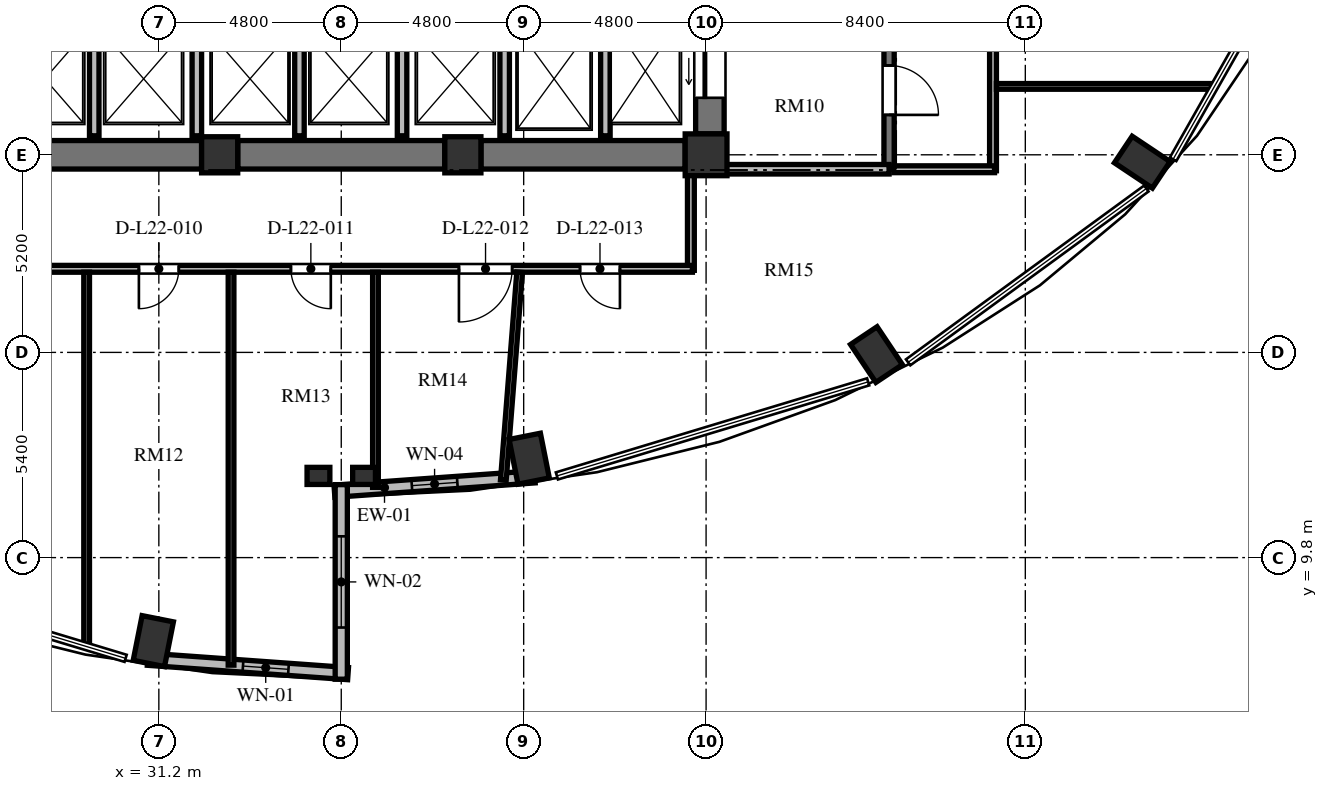
"""IFC4 building model, lengths in metres.
Left out: names, types, materials, properties, quantities, classifications, styles, units other than length and angle.
Written with IfcOpenShell. Run it as: python <this file> out.ifc"""

import sys

from ifc_helpers import new_model, si_unit, direction, frame, frame_2d, origin, origin_2d, place, context, subcontext, project, spatial, rectangle, extrude, element, fill, save


model = new_model("IFC4")
c1 = context("Model", 3, precision=1e-05, world=origin(), true_north=direction((0.0, 1.0)))
c2 = subcontext(c1, "Body", "Model", "MODEL_VIEW")
j1 = project(units=[si_unit("LENGTHUNIT", "METRE"), si_unit("PLANEANGLEUNIT", "RADIAN")], contexts=[c1])
p1 = place(None, origin())
s1 = spatial("IfcSite", under=j1, at=p1, CompositionType="ELEMENT")
p2 = place(p1, origin())
s2 = spatial("IfcBuilding", under=s1, at=p2, CompositionType="ELEMENT")
p3 = place(p2, frame((0.0, 0.0, 89.04)))
s3 = spatial("IfcBuildingStorey", under=s2, at=p3, CompositionType="ELEMENT", Elevation=89.04)
for number, where, z_axis, x_axis in (
    (1, (40.946, 12.403, 0.0), (0.0, 0.0, 1.0), (0.195, -0.981, 0.0)),
    (2, (50.084, 15.143, 0.0), (0.0, 0.0, 1.0), (0.556, -0.831, 0.0)),
    (3, (57.078, 20.205, 0.0), (0.0, 0.0, 1.0), (0.831, -0.556, 0.0)),
    (4, (31.054, 7.603, 0.0), (0.0, 0.0, 1.0), (-0.195, -0.981, 0.0)),
):
    element("IfcColumn", number, at=place(p3, frame(where, z_axis=z_axis, x_axis=x_axis)), inside=s3, PredefinedType="COLUMN", context=c2, shape_type="SweptSolid", body=[
        extrude(rectangle(XDim=1.2, YDim=0.84, at=origin_2d()), origin(), (0.0, 0.0, 1.0), 3.648),
    ])
for number, where, z_axis, x_axis in (
    (5, (32.8, 20.4, 0.0), (0.0, 0.0, 1.0), (1.0, 0.0, 0.0)),
    (6, (39.2, 20.4, 0.0), (0.0, 0.0, 1.0), (1.0, 0.0, 0.0)),
):
    element("IfcColumn", number, at=place(p3, frame(where, z_axis=z_axis, x_axis=x_axis)), inside=s3, PredefinedType="COLUMN", context=c2, shape_type="SweptSolid", body=[
        extrude(rectangle(XDim=0.95, YDim=0.95, at=origin_2d()), origin(), (0.0, 0.0, 1.0), 3.648),
    ])
p4 = place(p3, frame((45.6, 20.4, 0.0), z_axis=(0.0, 0.0, 1.0), x_axis=(1.0, 0.0, 0.0)))
e7 = element("IfcColumn", 7, at=p4, inside=s3, PredefinedType="COLUMN", context=c2, shape_type="SweptSolid", body=[
    extrude(rectangle(XDim=1.1, YDim=1.1, at=origin_2d()), origin(), (0.0, 0.0, 1.0), 3.648),
])
for number, where, z_axis, x_axis in (
    (8, (35.4, 11.95, 0.0), (0.0, 0.0, 1.0), (1.0, 0.0, 0.0)),
    (9, (36.6, 11.95, 0.0), (0.0, 0.0, 1.0), (1.0, 0.0, 0.0)),
):
    element("IfcColumn", number, at=place(p3, frame(where, z_axis=z_axis, x_axis=x_axis)), inside=s3, PredefinedType="PILASTER", context=c2, shape_type="SweptSolid", body=[
        extrude(rectangle(XDim=0.6, YDim=0.45, at=origin_2d()), origin(), (0.0, 0.0, 1.0), 3.648),
    ])
p5 = place(p3, frame((45.7, 20.95, 0.0), z_axis=(0.0, 0.0, 1.0), x_axis=(0.0, 1.0, 0.0)))
e10 = element("IfcWall", 10, at=p5, inside=s3, PredefinedType="SHEAR", context=c2, shape_type="SweptSolid", body=[
    extrude(rectangle(XDim=14.1, YDim=0.75, at=frame_2d((7.05, 0.0))), origin(), (0.0, 0.0, 1.0), 3.648),
])
p6 = place(p5, frame((11.75, 0.0, 0.0)))
e11 = element("IfcOpeningElement", 11, at=p6, cuts=e10, PredefinedType="OPENING", context=c2, shape_type="SweptSolid", body=[
    extrude(rectangle(XDim=1.4, YDim=2.3, at=frame_2d((0.7, 1.15))), frame((0.0, 0.385, 0.0), z_axis=(0.0, -1.0, 0.0), x_axis=(1.0, 0.0, 0.0)), (0.0, 0.0, 1.0), 0.77),
])
p7 = place(p5, frame((0.95, 0.0, 0.0)))
e12 = element("IfcOpeningElement", 12, at=p7, cuts=e10, PredefinedType="OPENING", context=c2, shape_type="SweptSolid", body=[
    extrude(rectangle(XDim=1.4, YDim=2.3, at=frame_2d((0.7, 1.15))), frame((0.0, 0.385, 0.0), z_axis=(0.0, -1.0, 0.0), x_axis=(1.0, 0.0, 0.0)), (0.0, 0.0, 1.0), 0.77),
])
p8 = place(p3, frame((26.95, 20.4, 0.0), z_axis=(0.0, 0.0, 1.0), x_axis=(1.0, 0.0, 0.0)))
e13 = element("IfcWall", 13, at=p8, inside=s3, PredefinedType="SHEAR", context=c2, shape_type="SweptSolid", body=[
    extrude(rectangle(XDim=5.375, YDim=0.75, at=frame_2d((2.688, 0.0))), origin(), (0.0, 0.0, 1.0), 3.648),
])
p9 = place(p3, frame((33.275, 20.4, 0.0), z_axis=(0.0, 0.0, 1.0), x_axis=(1.0, 0.0, 0.0)))
e14 = element("IfcWall", 14, at=p9, inside=s3, PredefinedType="SHEAR", context=c2, shape_type="SweptSolid", body=[
    extrude(rectangle(XDim=5.45, YDim=0.75, at=frame_2d((2.725, 0.0))), origin(), (0.0, 0.0, 1.0), 3.648),
])
p10 = place(p3, frame((39.675, 20.4, 0.0), z_axis=(0.0, 0.0, 1.0), x_axis=(1.0, 0.0, 0.0)))
e15 = element("IfcWall", 15, at=p10, inside=s3, PredefinedType="SHEAR", context=c2, shape_type="SweptSolid", body=[
    extrude(rectangle(XDim=5.375, YDim=0.75, at=frame_2d((2.688, 0.0))), origin(), (0.0, 0.0, 1.0), 3.648),
])
p11 = place(p3, frame((35.821, 11.547, 0.0), z_axis=(0.0, 0.0, 1.0), x_axis=(0.997432364291, 0.071614793619, 0.0)))
e16 = element("IfcWall", 16, at=p11, inside=s3, PredefinedType="SOLIDWALL", context=c2, shape_type="SweptSolid", body=[
    extrude(rectangle(XDim=5.284, YDim=0.32, at=frame_2d((2.642, 0.0))), origin(), (0.0, 0.0, 1.0), 3.428),
])
p12 = place(p11, frame((2.042, 0.0, 0.85)))
e17 = element("IfcOpeningElement", 17, at=p12, cuts=e16, PredefinedType="OPENING", context=c2, shape_type="SweptSolid", body=[
    extrude(rectangle(XDim=1.2, YDim=1.8, at=frame_2d((0.6, 0.9))), frame((0.0, 0.17, 0.0), z_axis=(0.0, -1.0, 0.0), x_axis=(1.0, 0.0, 0.0)), (0.0, 0.0, 1.0), 0.34),
])
p13 = place(p3, frame((30.909, 7.125, 0.0), z_axis=(0.0, 0.0, 1.0), x_axis=(0.997431890304, -0.071621394884, 0.0)))
e18 = element("IfcWall", 18, at=p13, inside=s3, PredefinedType="SOLIDWALL", context=c2, shape_type="SweptSolid", body=[
    extrude(rectangle(XDim=5.284, YDim=0.32, at=frame_2d((2.642, 0.0))), origin(), (0.0, 0.0, 1.0), 3.428),
])
p14 = place(p13, frame((2.511, 0.0, 0.85)))
e19 = element("IfcOpeningElement", 19, at=p14, cuts=e18, PredefinedType="OPENING", context=c2, shape_type="SweptSolid", body=[
    extrude(rectangle(XDim=1.2, YDim=2.2, at=frame_2d((0.6, 1.1))), frame((0.0, 0.17, 0.0), z_axis=(0.0, -1.0, 0.0), x_axis=(1.0, 0.0, 0.0)), (0.0, 0.0, 1.0), 0.34),
])
p15 = place(p3, frame((36.0, 6.6, 0.0), z_axis=(0.0, 0.0, 1.0), x_axis=(0.0, 1.0, 0.0)))
e20 = element("IfcWall", 20, at=p15, inside=s3, PredefinedType="SOLIDWALL", context=c2, shape_type="SweptSolid", body=[
    extrude(rectangle(XDim=5.12, YDim=0.32, at=frame_2d((2.56, 0.0))), origin(), (0.0, 0.0, 1.0), 3.428),
])
p16 = place(p15, frame((1.36, 0.0, 0.84)))
e21 = element("IfcOpeningElement", 21, at=p16, cuts=e20, PredefinedType="OPENING", context=c2, shape_type="SweptSolid", body=[
    extrude(rectangle(XDim=2.4, YDim=2.04, at=frame_2d((1.2, 1.02))), frame((0.0, 0.17, 0.0), z_axis=(0.0, -1.0, 0.0), x_axis=(1.0, 0.0, 0.0)), (0.0, 0.0, 1.0), 0.34),
])
p17 = place(p3, frame((42.95, 20.9, 0.0), z_axis=(0.0, 0.0, 1.0), x_axis=(0.0, 1.0, 0.0)))
e22 = element("IfcWall", 22, at=p17, inside=s3, PredefinedType="SOLIDWALL", context=c2, shape_type="SweptSolid", body=[
    extrude(rectangle(XDim=3.2, YDim=0.25, at=frame_2d((1.6, 0.0))), origin(), (0.0, 0.0, 1.0), 3.428),
])
for number, where, z_axis, x_axis in (
    (23, (29.5, 20.9, 0.0), (0.0, 0.0, 1.0), (0.0, 1.0, 0.0)),
    (24, (32.2, 20.9, 0.0), (0.0, 0.0, 1.0), (0.0, 1.0, 0.0)),
    (25, (34.9, 20.9, 0.0), (0.0, 0.0, 1.0), (0.0, 1.0, 0.0)),
    (26, (37.6, 20.9, 0.0), (0.0, 0.0, 1.0), (0.0, 1.0, 0.0)),
    (27, (40.3, 20.9, 0.0), (0.0, 0.0, 1.0), (0.0, 1.0, 0.0)),
):
    element("IfcWall", number, at=place(p3, frame(where, z_axis=z_axis, x_axis=x_axis)), inside=s3, PredefinedType="SOLIDWALL", context=c2, shape_type="SweptSolid", body=[
        extrude(rectangle(XDim=2.8, YDim=0.25, at=frame_2d((1.4, 0.0))), origin(), (0.0, 0.0, 1.0), 3.428),
    ])
p18 = place(p3, frame((50.415, 35.845, 0.0), z_axis=(0.0, 0.0, 1.0), x_axis=(0.0, -1.0, 0.0)))
e28 = element("IfcWall", 28, at=p18, inside=s3, PredefinedType="SHEAR", context=c2, shape_type="SweptSolid", body=[
    extrude(rectangle(XDim=15.825, YDim=0.27, at=frame_2d((7.913, 0.0))), origin(), (0.0, 0.0, 1.0), 3.648),
])
p19 = place(p18, frame((4.445, 0.0, 0.0)))
e29 = element("IfcOpeningElement", 29, at=p19, cuts=e28, PredefinedType="OPENING", context=c2, shape_type="SweptSolid", body=[
    extrude(rectangle(XDim=1.2, YDim=2.15, at=frame_2d((0.6, 1.075))), frame((0.0, 0.145, 0.0), z_axis=(0.0, -1.0, 0.0), x_axis=(1.0, 0.0, 0.0)), (0.0, 0.0, 1.0), 0.29),
])
p20 = place(p18, frame((1.295, 0.0, 0.0)))
e30 = element("IfcOpeningElement", 30, at=p20, cuts=e28, PredefinedType="OPENING", context=c2, shape_type="SweptSolid", body=[
    extrude(rectangle(XDim=1.3, YDim=2.2, at=frame_2d((0.65, 1.1))), frame((0.0, 0.145, 0.0), z_axis=(0.0, -1.0, 0.0), x_axis=(1.0, 0.0, 0.0)), (0.0, 0.0, 1.0), 0.29),
])
p21 = place(p18, frame((13.095, 0.0, 0.0)))
e31 = element("IfcOpeningElement", 31, at=p21, cuts=e28, PredefinedType="OPENING", context=c2, shape_type="SweptSolid", body=[
    extrude(rectangle(XDim=1.3, YDim=2.2, at=frame_2d((0.65, 1.1))), frame((0.0, 0.145, 0.0), z_axis=(0.0, -1.0, 0.0), x_axis=(1.0, 0.0, 0.0)), (0.0, 0.0, 1.0), 0.29),
])
p22 = place(p3, frame((45.7, 20.02, 0.0), z_axis=(0.0, 0.0, 1.0), x_axis=(1.0, 0.0, 0.0)))
e32 = element("IfcWall", 32, at=p22, inside=s3, PredefinedType="SOLIDWALL", context=c2, shape_type="SweptSolid", body=[
    extrude(rectangle(XDim=4.715, YDim=0.25, at=frame_2d((2.357, 0.0))), origin(), (0.0, 0.0, 1.0), 3.428),
])
p23 = place(p3, frame((53.15, 26.64, 0.0), z_axis=(0.0, 0.0, 1.0), x_axis=(0.0, -1.0, 0.0)))
e33 = element("IfcWall", 33, at=p23, inside=s3, PredefinedType="PARTITIONING", context=c2, shape_type="SweptSolid", body=[
    extrude(rectangle(XDim=6.66, YDim=0.18, at=frame_2d((3.33, 0.0))), origin(), (0.0, 0.0, 1.0), 3.428),
])
p24 = place(p3, frame((53.19, 20.02, 0.0), z_axis=(0.0, 0.0, 1.0), x_axis=(-1.0, 0.0, 0.0)))
e34 = element("IfcWall", 34, at=p24, inside=s3, PredefinedType="PARTITIONING", context=c2, shape_type="SweptSolid", body=[
    extrude(rectangle(XDim=2.65, YDim=0.18, at=frame_2d((1.325, 0.0))), origin(), (0.0, 0.0, 1.0), 3.428),
])
p25 = place(p3, frame((45.2, 19.91, 0.0), z_axis=(0.0, 0.0, 1.0), x_axis=(0.0, -1.0, 0.0)))
e35 = element("IfcWall", 35, at=p25, inside=s3, PredefinedType="PARTITIONING", context=c2, shape_type="SweptSolid", body=[
    extrude(rectangle(XDim=2.55, YDim=0.18, at=frame_2d((1.275, 0.0))), origin(), (0.0, 0.0, 1.0), 3.428),
])
p26 = place(p3, frame((45.24, 17.4, 0.0), z_axis=(0.0, 0.0, 1.0), x_axis=(-1.0, 0.0, 0.0)))
e36 = element("IfcWall", 36, at=p26, inside=s3, PredefinedType="PARTITIONING", context=c2, shape_type="SweptSolid", body=[
    extrude(rectangle(XDim=21.93, YDim=0.18, at=frame_2d((10.965, 0.0))), origin(), (0.0, 0.0, 1.0), 3.053),
])
p27 = place(p26, frame((18.251, 0.0, 0.0)))
e37 = element("IfcOpeningElement", 37, at=p27, cuts=e36, PredefinedType="OPENING", context=c2, shape_type="SweptSolid", body=[
    extrude(rectangle(XDim=1.05, YDim=2.15, at=frame_2d((0.525, 1.075))), frame((0.0, 0.1, 0.0), z_axis=(0.0, -1.0, 0.0), x_axis=(1.0, 0.0, 0.0)), (0.0, 0.0, 1.0), 0.2),
])
p28 = place(p26, frame((13.515, 0.0, 0.0)))
e38 = element("IfcOpeningElement", 38, at=p28, cuts=e36, PredefinedType="OPENING", context=c2, shape_type="SweptSolid", body=[
    extrude(rectangle(XDim=1.05, YDim=2.15, at=frame_2d((0.525, 1.075))), frame((0.0, 0.1, 0.0), z_axis=(0.0, -1.0, 0.0), x_axis=(1.0, 0.0, 0.0)), (0.0, 0.0, 1.0), 0.2),
])
p29 = place(p26, frame((9.515, 0.0, 0.0)))
e39 = element("IfcOpeningElement", 39, at=p29, cuts=e36, PredefinedType="OPENING", context=c2, shape_type="SweptSolid", body=[
    extrude(rectangle(XDim=1.05, YDim=2.15, at=frame_2d((0.525, 1.075))), frame((0.0, 0.1, 0.0), z_axis=(0.0, -1.0, 0.0), x_axis=(1.0, 0.0, 0.0)), (0.0, 0.0, 1.0), 0.2),
])
p30 = place(p26, frame((4.743, 0.0, 0.0)))
e40 = element("IfcOpeningElement", 40, at=p30, cuts=e36, PredefinedType="OPENING", context=c2, shape_type="SweptSolid", body=[
    extrude(rectangle(XDim=1.4, YDim=2.2, at=frame_2d((0.7, 1.1))), frame((0.0, 0.1, 0.0), z_axis=(0.0, -1.0, 0.0), x_axis=(1.0, 0.0, 0.0)), (0.0, 0.0, 1.0), 0.2),
])
p31 = place(p26, frame((1.907, 0.0, 0.0)))
e41 = element("IfcOpeningElement", 41, at=p31, cuts=e36, PredefinedType="OPENING", context=c2, shape_type="SweptSolid", body=[
    extrude(rectangle(XDim=1.05, YDim=2.15, at=frame_2d((0.525, 1.075))), frame((0.0, 0.1, 0.0), z_axis=(0.0, -1.0, 0.0), x_axis=(1.0, 0.0, 0.0)), (0.0, 0.0, 1.0), 0.2),
])
p32 = place(p3, frame((53.24, 22.2, 0.0), z_axis=(0.0, 0.0, 1.0), x_axis=(1.0, 0.0, 0.0)))
e42 = element("IfcWall", 42, at=p32, inside=s3, PredefinedType="PARTITIONING", context=c2, shape_type="SweptSolid", body=[
    extrude(rectangle(XDim=5.731, YDim=0.15, at=frame_2d((2.866, 0.0))), origin(), (0.0, 0.0, 1.0), 3.428),
])
p33 = place(p3, frame((29.3, 7.473, 0.0), z_axis=(0.0, 0.0, 1.0), x_axis=(0.0, 1.0, 0.0)))
e43 = element("IfcWall", 43, at=p33, inside=s3, PredefinedType="PARTITIONING", context=c2, shape_type="SweptSolid", body=[
    extrude(rectangle(XDim=9.837, YDim=0.15, at=frame_2d((4.918, 0.0))), origin(), (0.0, 0.0, 1.0), 3.428),
])
p34 = place(p3, frame((33.1, 6.971, 0.0), z_axis=(0.0, 0.0, 1.0), x_axis=(0.0, 1.0, 0.0)))
e44 = element("IfcWall", 44, at=p34, inside=s3, PredefinedType="PARTITIONING", context=c2, shape_type="SweptSolid", body=[
    extrude(rectangle(XDim=10.339, YDim=0.15, at=frame_2d((5.17, 0.0))), origin(), (0.0, 0.0, 1.0), 3.428),
])
p35 = place(p3, frame((36.9, 11.649, 0.0), z_axis=(0.0, 0.0, 1.0), x_axis=(0.0, 1.0, 0.0)))
e45 = element("IfcWall", 45, at=p35, inside=s3, PredefinedType="PARTITIONING", context=c2, shape_type="SweptSolid", body=[
    extrude(rectangle(XDim=5.661, YDim=0.15, at=frame_2d((2.83, 0.0))), origin(), (0.0, 0.0, 1.0), 3.428),
])
p36 = place(p3, frame((40.265, 11.838, 0.0), z_axis=(0.0, 0.0, 1.0), x_axis=(0.078196446306, 0.996937969878, 0.0)))
e46 = element("IfcWall", 46, at=p36, inside=s3, PredefinedType="PARTITIONING", context=c2, shape_type="SweptSolid", body=[
    extrude(rectangle(XDim=5.489, YDim=0.15, at=frame_2d((2.744, 0.0))), origin(), (0.0, 0.0, 1.0), 3.428),
])
p37 = place(p12, origin())
e47 = element("IfcWindow", 47, at=p37, inside=s3, PartitioningType="SINGLE_PANEL", PredefinedType="WINDOW", context=c2, shape_type="SweptSolid", body=[
    extrude(rectangle(XDim=1.2, YDim=1.8, at=frame_2d((0.6, 0.9))), frame((0.0, 0.03, 0.0), z_axis=(0.0, -1.0, 0.0), x_axis=(1.0, 0.0, 0.0)), (0.0, 0.0, 1.0), 0.06),
])
fill(e17, e47)
p38 = place(p14, origin())
e48 = element("IfcWindow", 48, at=p38, inside=s3, PartitioningType="SINGLE_PANEL", PredefinedType="WINDOW", context=c2, shape_type="SweptSolid", body=[
    extrude(rectangle(XDim=1.2, YDim=2.2, at=frame_2d((0.6, 1.1))), frame((0.0, 0.03, 0.0), z_axis=(0.0, -1.0, 0.0), x_axis=(1.0, 0.0, 0.0)), (0.0, 0.0, 1.0), 0.06),
])
fill(e19, e48)
p39 = place(p16, origin())
e49 = element("IfcWindow", 49, at=p39, inside=s3, PartitioningType="SINGLE_PANEL", PredefinedType="WINDOW", context=c2, shape_type="SweptSolid", body=[
    extrude(rectangle(XDim=2.4, YDim=2.04, at=frame_2d((1.2, 1.02))), frame((0.0, 0.03, 0.0), z_axis=(0.0, -1.0, 0.0), x_axis=(1.0, 0.0, 0.0)), (0.0, 0.0, 1.0), 0.06),
])
fill(e21, e49)
p40 = place(p7, origin())
e50 = element("IfcDoor", 50, at=p40, inside=s3, OperationType="SLIDING_TO_LEFT", PredefinedType="DOOR", context=c2, shape_type="SweptSolid", body=[
    extrude(rectangle(XDim=1.4, YDim=2.3, at=frame_2d((0.7, 1.15))), frame((0.0, 0.025, 0.0), z_axis=(0.0, -1.0, 0.0), x_axis=(1.0, 0.0, 0.0)), (0.0, 0.0, 1.0), 0.05),
])
fill(e12, e50)
p41 = place(p21, origin())
e51 = element("IfcDoor", 51, at=p41, inside=s3, OperationType="SINGLE_SWING_RIGHT", PredefinedType="DOOR", context=c2, shape_type="SweptSolid", body=[
    extrude(rectangle(XDim=1.3, YDim=2.2, at=frame_2d((0.65, 1.1))), frame((0.0, 0.025, 0.0), z_axis=(0.0, -1.0, 0.0), x_axis=(1.0, 0.0, 0.0)), (0.0, 0.0, 1.0), 0.05),
])
fill(e31, e51)
p42 = place(p28, origin())
e52 = element("IfcDoor", 52, at=p42, inside=s3, OperationType="SINGLE_SWING_RIGHT", PredefinedType="DOOR", context=c2, shape_type="SweptSolid", body=[
    extrude(rectangle(XDim=1.05, YDim=2.15, at=frame_2d((0.525, 1.075))), frame((0.0, 0.025, 0.0), z_axis=(0.0, -1.0, 0.0), x_axis=(1.0, 0.0, 0.0)), (0.0, 0.0, 1.0), 0.05),
])
fill(e38, e52)
p43 = place(p29, origin())
e53 = element("IfcDoor", 53, at=p43, inside=s3, OperationType="SINGLE_SWING_LEFT", PredefinedType="DOOR", context=c2, shape_type="SweptSolid", body=[
    extrude(rectangle(XDim=1.05, YDim=2.15, at=frame_2d((0.525, 1.075))), frame((0.0, 0.025, 0.0), z_axis=(0.0, -1.0, 0.0), x_axis=(1.0, 0.0, 0.0)), (0.0, 0.0, 1.0), 0.05),
])
fill(e39, e53)
p44 = place(p30, origin())
e54 = element("IfcDoor", 54, at=p44, inside=s3, OperationType="SINGLE_SWING_RIGHT", PredefinedType="DOOR", context=c2, shape_type="SweptSolid", body=[
    extrude(rectangle(XDim=1.4, YDim=2.2, at=frame_2d((0.7, 1.1))), frame((0.0, 0.025, 0.0), z_axis=(0.0, -1.0, 0.0), x_axis=(1.0, 0.0, 0.0)), (0.0, 0.0, 1.0), 0.05),
])
fill(e40, e54)
p45 = place(p31, origin())
e55 = element("IfcDoor", 55, at=p45, inside=s3, OperationType="SINGLE_SWING_LEFT", PredefinedType="DOOR", context=c2, shape_type="SweptSolid", body=[
    extrude(rectangle(XDim=1.05, YDim=2.15, at=frame_2d((0.525, 1.075))), frame((0.0, 0.025, 0.0), z_axis=(0.0, -1.0, 0.0), x_axis=(1.0, 0.0, 0.0)), (0.0, 0.0, 1.0), 0.05),
])
fill(e41, e55)
save(model, sys.argv[1])
